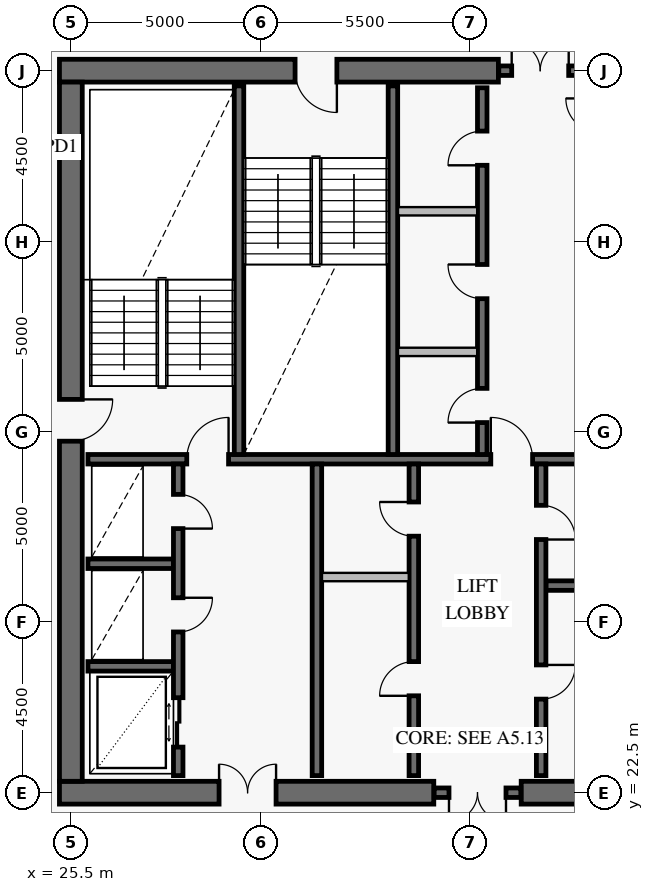
"""IFC4 building model, lengths in metres.
Left out: names, types, materials, properties, quantities, classifications, styles, units other than length and angle.
Written with IfcOpenShell. Run it as: python <this file> out.ifc"""

import sys

from ifc_helpers import new_model, si_unit, direction, frame, frame_2d, origin, place, context, subcontext, project, spatial, rectangle, extrude, element, fill, save


model = new_model("IFC4")
c1 = context("Model", 3, precision=1e-05, world=origin(), true_north=direction((0.0, 1.0)))
c2 = subcontext(c1, "Body", "Model", "MODEL_VIEW")
j1 = project(units=[si_unit("LENGTHUNIT", "METRE"), si_unit("PLANEANGLEUNIT", "RADIAN")], contexts=[c1])
p1 = place(None, origin())
s1 = spatial("IfcSite", under=j1, at=p1, CompositionType="ELEMENT")
p2 = place(p1, origin())
s2 = spatial("IfcBuilding", under=s1, at=p2, CompositionType="ELEMENT")
p3 = place(p2, frame((0.0, 0.0, 254.0)))
s3 = spatial("IfcBuildingStorey", under=s2, at=p3, CompositionType="ELEMENT", Elevation=254.0)
p4 = place(p3, frame((25.2, 22.5, 0.0), z_axis=(0.0, 0.0, 1.0), x_axis=(1.0, 0.0, 0.0)))
e1 = element("IfcWall", 1, at=p4, inside=s3, PredefinedType="SHEAR", context=c2, shape_type="SweptSolid", body=[
    extrude(rectangle(XDim=9.85, YDim=0.6, at=frame_2d((4.925, 0.0))), origin(), (0.0, 0.0, 1.0), 3.8),
])
p5 = place(p4, frame((4.2, 0.0, 0.0)))
e2 = element("IfcOpeningElement", 2, at=p5, cuts=e1, PredefinedType="OPENING", context=c2, shape_type="SweptSolid", body=[
    extrude(rectangle(XDim=1.5, YDim=2.15, at=frame_2d((0.75, 1.075))), frame((0.0, 0.312, 0.0), z_axis=(0.0, -1.0, 0.0), x_axis=(1.0, 0.0, 0.0)), (0.0, 0.0, 1.0), 0.624),
])
p6 = place(p3, frame((37.35, 22.5, 0.0), z_axis=(0.0, 0.0, 1.0), x_axis=(1.0, 0.0, 0.0)))
e3 = element("IfcWall", 3, at=p6, inside=s3, PredefinedType="SHEAR", context=c2, shape_type="SweptSolid", body=[
    extrude(rectangle(XDim=9.45, YDim=0.6, at=frame_2d((4.725, 0.0))), origin(), (0.0, 0.0, 1.0), 3.8),
])
p7 = place(p6, frame((3.95, 0.0, 0.0)))
e4 = element("IfcOpeningElement", 4, at=p7, cuts=e3, PredefinedType="OPENING", context=c2, shape_type="SweptSolid", body=[
    extrude(rectangle(XDim=1.5, YDim=2.15, at=frame_2d((0.75, 1.075))), frame((0.0, 0.312, 0.0), z_axis=(0.0, -1.0, 0.0), x_axis=(1.0, 0.0, 0.0)), (0.0, 0.0, 1.0), 0.624),
])
p8 = place(p3, frame((36.75, 41.5, 0.0), z_axis=(0.0, 0.0, 1.0), x_axis=(-1.0, 0.0, 0.0)))
e5 = element("IfcWall", 5, at=p8, inside=s3, PredefinedType="SHEAR", context=c2, shape_type="SweptSolid", body=[
    extrude(rectangle(XDim=11.55, YDim=0.6, at=frame_2d((5.775, 0.0))), origin(), (0.0, 0.0, 1.0), 3.8),
])
p9 = place(p8, frame((4.25, 0.0, 0.0)))
e6 = element("IfcOpeningElement", 6, at=p9, cuts=e5, PredefinedType="OPENING", context=c2, shape_type="SweptSolid", body=[
    extrude(rectangle(XDim=1.1, YDim=2.15, at=frame_2d((0.55, 1.075))), frame((0.0, 0.312, 0.0), z_axis=(0.0, -1.0, 0.0), x_axis=(1.0, 0.0, 0.0)), (0.0, 0.0, 1.0), 0.624),
])
p10 = place(p3, frame((25.5, 22.8, 0.0), z_axis=(0.0, 0.0, 1.0), x_axis=(0.0, 1.0, 0.0)))
e7 = element("IfcWall", 7, at=p10, inside=s3, PredefinedType="SHEAR", context=c2, shape_type="SweptSolid", body=[
    extrude(rectangle(XDim=18.4, YDim=0.6, at=frame_2d((9.2, 0.0))), origin(), (0.0, 0.0, 1.0), 3.8),
])
p11 = place(p10, frame((8.95, 0.0, 0.0)))
e8 = element("IfcOpeningElement", 8, at=p11, cuts=e7, PredefinedType="OPENING", context=c2, shape_type="SweptSolid", body=[
    extrude(rectangle(XDim=1.1, YDim=2.15, at=frame_2d((0.55, 1.075))), frame((0.0, 0.312, 0.0), z_axis=(0.0, -1.0, 0.0), x_axis=(1.0, 0.0, 0.0)), (0.0, 0.0, 1.0), 0.624),
])
p12 = place(p3, frame((35.06, 22.5, 0.0), z_axis=(0.0, 0.0, 1.0), x_axis=(1.0, 0.0, 0.0)))
e9 = element("IfcWall", 9, at=p12, inside=s3, PredefinedType="SOLIDWALL", context=c2, shape_type="SweptSolid", body=[
    extrude(rectangle(XDim=2.28, YDim=0.25, at=frame_2d((1.14, 0.0))), origin(), (0.0, 0.0, 1.0), 3.8),
])
p13 = place(p12, frame((0.39, 0.0, 0.0)))
e10 = element("IfcOpeningElement", 10, at=p13, cuts=e9, PredefinedType="OPENING", context=c2, shape_type="SweptSolid", body=[
    extrude(rectangle(XDim=1.5, YDim=2.15, at=frame_2d((0.75, 1.075))), frame((0.0, 0.137, 0.0), z_axis=(0.0, -1.0, 0.0), x_axis=(1.0, 0.0, 0.0)), (0.0, 0.0, 1.0), 0.274),
])
p14 = place(p3, frame((36.76, 41.5, 0.0), z_axis=(0.0, 0.0, 1.0), x_axis=(1.0, 0.0, 0.0)))
e11 = element("IfcWall", 11, at=p14, inside=s3, PredefinedType="SOLIDWALL", context=c2, shape_type="SweptSolid", body=[
    extrude(rectangle(XDim=2.18, YDim=0.25, at=frame_2d((1.09, 0.0))), origin(), (0.0, 0.0, 1.0), 3.8),
])
p15 = place(p14, frame((0.34, 0.0, 0.0)))
e12 = element("IfcOpeningElement", 12, at=p15, cuts=e11, PredefinedType="OPENING", context=c2, shape_type="SweptSolid", body=[
    extrude(rectangle(XDim=1.5, YDim=2.15, at=frame_2d((0.75, 1.075))), frame((0.0, 0.137, 0.0), z_axis=(0.0, -1.0, 0.0), x_axis=(1.0, 0.0, 0.0)), (0.0, 0.0, 1.0), 0.274),
])
p16 = place(p3, frame((25.95, 31.275, 0.0), z_axis=(0.0, 0.0, 1.0), x_axis=(1.0, 0.0, 0.0)))
e13 = element("IfcWall", 13, at=p16, inside=s3, PredefinedType="SOLIDWALL", context=c2, shape_type="SweptSolid", body=[
    extrude(rectangle(XDim=20.1, YDim=0.25, at=frame_2d((10.05, 0.0))), origin(), (0.0, 0.0, 1.0), 3.8),
])
p17 = place(p16, frame((2.6, 0.0, 0.0)))
e14 = element("IfcOpeningElement", 14, at=p17, cuts=e13, PredefinedType="OPENING", context=c2, shape_type="SweptSolid", body=[
    extrude(rectangle(XDim=1.1, YDim=2.15, at=frame_2d((0.55, 1.075))), frame((0.0, 0.137, 0.0), z_axis=(0.0, -1.0, 0.0), x_axis=(1.0, 0.0, 0.0)), (0.0, 0.0, 1.0), 0.274),
])
p18 = place(p16, frame((10.6, 0.0, 0.0)))
e15 = element("IfcOpeningElement", 15, at=p18, cuts=e13, PredefinedType="OPENING", context=c2, shape_type="SweptSolid", body=[
    extrude(rectangle(XDim=1.1, YDim=2.15, at=frame_2d((0.55, 1.075))), frame((0.0, 0.137, 0.0), z_axis=(0.0, -1.0, 0.0), x_axis=(1.0, 0.0, 0.0)), (0.0, 0.0, 1.0), 0.274),
])
p19 = place(p16, frame((16.35, 0.0, 0.0)))
e16 = element("IfcOpeningElement", 16, at=p19, cuts=e13, PredefinedType="OPENING", context=c2, shape_type="SweptSolid", body=[
    extrude(rectangle(XDim=1.1, YDim=2.15, at=frame_2d((0.55, 1.075))), frame((0.0, 0.137, 0.0), z_axis=(0.0, -1.0, 0.0), x_axis=(1.0, 0.0, 0.0)), (0.0, 0.0, 1.0), 0.274),
])
for number, where, z_axis, x_axis in (
    (17, (29.925, 31.4, 0.0), (0.0, 0.0, 1.0), (0.0, 1.0, 0.0)),
    (18, (33.975, 31.4, 0.0), (0.0, 0.0, 1.0), (0.0, 1.0, 0.0)),
):
    element("IfcWall", number, at=place(p3, frame(where, z_axis=z_axis, x_axis=x_axis)), inside=s3, PredefinedType="SOLIDWALL", context=c2, shape_type="SweptSolid", body=[
        extrude(rectangle(XDim=9.7, YDim=0.25, at=frame_2d((4.85, 0.0))), origin(), (0.0, 0.0, 1.0), 3.8),
    ])
p20 = place(p3, frame((36.325, 31.4, 0.0), z_axis=(0.0, 0.0, 1.0), x_axis=(0.0, 1.0, 0.0)))
e19 = element("IfcWall", 19, at=p20, inside=s3, PredefinedType="SOLIDWALL", context=c2, shape_type="SweptSolid", body=[
    extrude(rectangle(XDim=9.65, YDim=0.25, at=frame_2d((4.825, 0.0))), origin(), (0.0, 0.0, 1.0), 3.8),
])
p21 = place(p20, frame((0.84, 0.0, 0.0)))
e20 = element("IfcOpeningElement", 20, at=p21, cuts=e19, PredefinedType="OPENING", context=c2, shape_type="SweptSolid", body=[
    extrude(rectangle(XDim=0.9, YDim=2.1, at=frame_2d((0.45, 1.05))), frame((0.0, 0.137, 0.0), z_axis=(0.0, -1.0, 0.0), x_axis=(1.0, 0.0, 0.0)), (0.0, 0.0, 1.0), 0.274),
])
p22 = place(p20, frame((4.1, 0.0, 0.0)))
e21 = element("IfcOpeningElement", 21, at=p22, cuts=e19, PredefinedType="OPENING", context=c2, shape_type="SweptSolid", body=[
    extrude(rectangle(XDim=0.9, YDim=2.1, at=frame_2d((0.45, 1.05))), frame((0.0, 0.137, 0.0), z_axis=(0.0, -1.0, 0.0), x_axis=(1.0, 0.0, 0.0)), (0.0, 0.0, 1.0), 0.274),
])
p23 = place(p20, frame((7.61, 0.0, 0.0)))
e22 = element("IfcOpeningElement", 22, at=p23, cuts=e19, PredefinedType="OPENING", context=c2, shape_type="SweptSolid", body=[
    extrude(rectangle(XDim=0.9, YDim=2.1, at=frame_2d((0.45, 1.05))), frame((0.0, 0.137, 0.0), z_axis=(0.0, -1.0, 0.0), x_axis=(1.0, 0.0, 0.0)), (0.0, 0.0, 1.0), 0.274),
])
for number, where, z_axis, x_axis in (
    (23, (25.95, 25.825, 0.0), (0.0, 0.0, 1.0), (1.0, 0.0, 0.0)),
    (24, (25.95, 28.525, 0.0), (0.0, 0.0, 1.0), (1.0, 0.0, 0.0)),
):
    element("IfcWall", number, at=place(p3, frame(where, z_axis=z_axis, x_axis=x_axis)), inside=s3, PredefinedType="SOLIDWALL", context=c2, shape_type="SweptSolid", body=[
        extrude(rectangle(XDim=2.25, YDim=0.25, at=frame_2d((1.125, 0.0))), origin(), (0.0, 0.0, 1.0), 3.8),
    ])
p24 = place(p3, frame((28.325, 22.95, 0.0), z_axis=(0.0, 0.0, 1.0), x_axis=(0.0, 1.0, 0.0)))
e25 = element("IfcWall", 25, at=p24, inside=s3, PredefinedType="SOLIDWALL", context=c2, shape_type="SweptSolid", body=[
    extrude(rectangle(XDim=8.2, YDim=0.25, at=frame_2d((4.1, 0.0))), origin(), (0.0, 0.0, 1.0), 3.8),
])
p25 = place(p24, frame((0.75, 0.0, 0.0)))
e26 = element("IfcOpeningElement", 26, at=p25, cuts=e25, PredefinedType="OPENING", context=c2, shape_type="SweptSolid", body=[
    extrude(rectangle(XDim=1.3, YDim=2.3, at=frame_2d((0.65, 1.15))), frame((0.0, 0.137, 0.0), z_axis=(0.0, -1.0, 0.0), x_axis=(1.0, 0.0, 0.0)), (0.0, 0.0, 1.0), 0.274),
])
p26 = place(p24, frame((3.78, 0.0, 0.0)))
e27 = element("IfcOpeningElement", 27, at=p26, cuts=e25, PredefinedType="OPENING", context=c2, shape_type="SweptSolid", body=[
    extrude(rectangle(XDim=0.9, YDim=2.1, at=frame_2d((0.45, 1.05))), frame((0.0, 0.137, 0.0), z_axis=(0.0, -1.0, 0.0), x_axis=(1.0, 0.0, 0.0)), (0.0, 0.0, 1.0), 0.274),
])
p27 = place(p24, frame((6.5, 0.0, 0.0)))
e28 = element("IfcOpeningElement", 28, at=p27, cuts=e25, PredefinedType="OPENING", context=c2, shape_type="SweptSolid", body=[
    extrude(rectangle(XDim=0.9, YDim=2.1, at=frame_2d((0.45, 1.05))), frame((0.0, 0.137, 0.0), z_axis=(0.0, -1.0, 0.0), x_axis=(1.0, 0.0, 0.0)), (0.0, 0.0, 1.0), 0.274),
])
p28 = place(p3, frame((31.975, 22.95, 0.0), z_axis=(0.0, 0.0, 1.0), x_axis=(0.0, 1.0, 0.0)))
e29 = element("IfcWall", 29, at=p28, inside=s3, PredefinedType="SOLIDWALL", context=c2, shape_type="SweptSolid", body=[
    extrude(rectangle(XDim=8.2, YDim=0.25, at=frame_2d((4.1, 0.0))), origin(), (0.0, 0.0, 1.0), 3.8),
])
p29 = place(p3, frame((34.525, 22.95, 0.0), z_axis=(0.0, 0.0, 1.0), x_axis=(0.0, 1.0, 0.0)))
e30 = element("IfcWall", 30, at=p29, inside=s3, PredefinedType="SOLIDWALL", context=c2, shape_type="SweptSolid", body=[
    extrude(rectangle(XDim=8.2, YDim=0.25, at=frame_2d((4.1, 0.0))), origin(), (0.0, 0.0, 1.0), 3.8),
])
p30 = place(p29, frame((2.1, 0.0, 0.0)))
e31 = element("IfcOpeningElement", 31, at=p30, cuts=e30, PredefinedType="OPENING", context=c2, shape_type="SweptSolid", body=[
    extrude(rectangle(XDim=0.9, YDim=2.1, at=frame_2d((0.45, 1.05))), frame((0.0, 0.137, 0.0), z_axis=(0.0, -1.0, 0.0), x_axis=(1.0, 0.0, 0.0)), (0.0, 0.0, 1.0), 0.274),
])
p31 = place(p29, frame((6.3, 0.0, 0.0)))
e32 = element("IfcOpeningElement", 32, at=p31, cuts=e30, PredefinedType="OPENING", context=c2, shape_type="SweptSolid", body=[
    extrude(rectangle(XDim=0.9, YDim=2.1, at=frame_2d((0.45, 1.05))), frame((0.0, 0.137, 0.0), z_axis=(0.0, -1.0, 0.0), x_axis=(1.0, 0.0, 0.0)), (0.0, 0.0, 1.0), 0.274),
])
p32 = place(p3, frame((38.0, 27.95, 0.0), z_axis=(0.0, 0.0, 1.0), x_axis=(1.0, 0.0, 0.0)))
e33 = element("IfcWall", 33, at=p32, inside=s3, PredefinedType="SOLIDWALL", context=c2, shape_type="SweptSolid", body=[
    extrude(rectangle(XDim=2.3, YDim=0.25, at=frame_2d((1.15, 0.0))), origin(), (0.0, 0.0, 1.0), 3.8),
])
p33 = place(p3, frame((37.875, 22.95, 0.0), z_axis=(0.0, 0.0, 1.0), x_axis=(0.0, 1.0, 0.0)))
e34 = element("IfcWall", 34, at=p33, inside=s3, PredefinedType="SOLIDWALL", context=c2, shape_type="SweptSolid", body=[
    extrude(rectangle(XDim=8.2, YDim=0.25, at=frame_2d((4.1, 0.0))), origin(), (0.0, 0.0, 1.0), 3.8),
])
p34 = place(p33, frame((2.012, 0.0, 0.0)))
e35 = element("IfcOpeningElement", 35, at=p34, cuts=e34, PredefinedType="OPENING", context=c2, shape_type="SweptSolid", body=[
    extrude(rectangle(XDim=0.9, YDim=2.1, at=frame_2d((0.45, 1.05))), frame((0.0, 0.137, 0.0), z_axis=(0.0, -1.0, 0.0), x_axis=(1.0, 0.0, 0.0)), (0.0, 0.0, 1.0), 0.274),
])
p35 = place(p33, frame((6.212, 0.0, 0.0)))
e36 = element("IfcOpeningElement", 36, at=p35, cuts=e34, PredefinedType="OPENING", context=c2, shape_type="SweptSolid", body=[
    extrude(rectangle(XDim=0.9, YDim=2.1, at=frame_2d((0.45, 1.05))), frame((0.0, 0.137, 0.0), z_axis=(0.0, -1.0, 0.0), x_axis=(1.0, 0.0, 0.0)), (0.0, 0.0, 1.0), 0.274),
])
for number, where, z_axis, x_axis in (
    (37, (34.108, 34.1, 0.0), (0.0, 0.0, 1.0), (1.0, 0.0, 0.0)),
    (38, (34.108, 37.8, 0.0), (0.0, 0.0, 1.0), (1.0, 0.0, 0.0)),
):
    element("IfcWall", number, at=place(p3, frame(where, z_axis=z_axis, x_axis=x_axis)), inside=s3, PredefinedType="PARTITIONING", context=c2, shape_type="SweptSolid", body=[
        extrude(rectangle(XDim=2.084, YDim=0.22, at=frame_2d((1.042, 0.0))), origin(), (0.0, 0.0, 1.0), 3.55),
    ])
p36 = place(p3, frame((32.108, 28.175, 0.0), z_axis=(0.0, 0.0, 1.0), x_axis=(1.0, 0.0, 0.0)))
e39 = element("IfcWall", 39, at=p36, inside=s3, PredefinedType="PARTITIONING", context=c2, shape_type="SweptSolid", body=[
    extrude(rectangle(XDim=2.284, YDim=0.22, at=frame_2d((1.142, 0.0))), origin(), (0.0, 0.0, 1.0), 3.55),
])
p37 = place(p11, frame((1.1, 0.0, 0.0), z_axis=(0.0, 0.0, 1.0), x_axis=(-1.0, 0.0, 0.0)))
e40 = element("IfcDoor", 40, at=p37, inside=s3, OperationType="SINGLE_SWING_LEFT", PredefinedType="USERDEFINED", context=c2, shape_type="SweptSolid", body=[
    extrude(rectangle(XDim=1.1, YDim=2.15, at=frame_2d((0.55, 1.075))), frame((0.0, 0.025, 0.0), z_axis=(0.0, -1.0, 0.0), x_axis=(1.0, 0.0, 0.0)), (0.0, 0.0, 1.0), 0.05),
])
fill(e8, e40)
p38 = place(p9, origin())
e41 = element("IfcDoor", 41, at=p38, inside=s3, OperationType="SINGLE_SWING_LEFT", PredefinedType="USERDEFINED", context=c2, shape_type="SweptSolid", body=[
    extrude(rectangle(XDim=1.1, YDim=2.15, at=frame_2d((0.55, 1.075))), frame((0.0, 0.025, 0.0), z_axis=(0.0, -1.0, 0.0), x_axis=(1.0, 0.0, 0.0)), (0.0, 0.0, 1.0), 0.05),
])
fill(e6, e41)
p39 = place(p5, origin())
e42 = element("IfcDoor", 42, at=p39, inside=s3, OperationType="DOUBLE_DOOR_SINGLE_SWING", PredefinedType="DOOR", context=c2, shape_type="SweptSolid", body=[
    extrude(rectangle(XDim=1.5, YDim=2.15, at=frame_2d((0.75, 1.075))), frame((0.0, 0.025, 0.0), z_axis=(0.0, -1.0, 0.0), x_axis=(1.0, 0.0, 0.0)), (0.0, 0.0, 1.0), 0.05),
])
fill(e2, e42)
p40 = place(p13, frame((1.5, 0.0, 0.0), z_axis=(0.0, 0.0, 1.0), x_axis=(-1.0, 0.0, 0.0)))
e43 = element("IfcDoor", 43, at=p40, inside=s3, OperationType="DOUBLE_DOOR_SINGLE_SWING", PredefinedType="DOOR", context=c2, shape_type="SweptSolid", body=[
    extrude(rectangle(XDim=1.5, YDim=2.15, at=frame_2d((0.75, 1.075))), frame((0.0, 0.025, 0.0), z_axis=(0.0, -1.0, 0.0), x_axis=(1.0, 0.0, 0.0)), (0.0, 0.0, 1.0), 0.05),
])
fill(e10, e43)
p41 = place(p15, origin())
e44 = element("IfcDoor", 44, at=p41, inside=s3, OperationType="DOUBLE_DOOR_SINGLE_SWING", PredefinedType="DOOR", context=c2, shape_type="SweptSolid", body=[
    extrude(rectangle(XDim=1.5, YDim=2.15, at=frame_2d((0.75, 1.075))), frame((0.0, 0.025, 0.0), z_axis=(0.0, -1.0, 0.0), x_axis=(1.0, 0.0, 0.0)), (0.0, 0.0, 1.0), 0.05),
])
fill(e12, e44)
p42 = place(p17, origin())
e45 = element("IfcDoor", 45, at=p42, inside=s3, OperationType="SINGLE_SWING_RIGHT", PredefinedType="USERDEFINED", context=c2, shape_type="SweptSolid", body=[
    extrude(rectangle(XDim=1.1, YDim=2.15, at=frame_2d((0.55, 1.075))), frame((0.0, 0.025, 0.0), z_axis=(0.0, -1.0, 0.0), x_axis=(1.0, 0.0, 0.0)), (0.0, 0.0, 1.0), 0.05),
])
fill(e14, e45)
p43 = place(p18, origin())
e46 = element("IfcDoor", 46, at=p43, inside=s3, OperationType="SINGLE_SWING_LEFT", PredefinedType="USERDEFINED", context=c2, shape_type="SweptSolid", body=[
    extrude(rectangle(XDim=1.1, YDim=2.15, at=frame_2d((0.55, 1.075))), frame((0.0, 0.025, 0.0), z_axis=(0.0, -1.0, 0.0), x_axis=(1.0, 0.0, 0.0)), (0.0, 0.0, 1.0), 0.05),
])
fill(e15, e46)
p44 = place(p21, origin())
e47 = element("IfcDoor", 47, at=p44, inside=s3, OperationType="SINGLE_SWING_LEFT", PredefinedType="DOOR", context=c2, shape_type="SweptSolid", body=[
    extrude(rectangle(XDim=0.9, YDim=2.1, at=frame_2d((0.45, 1.05))), frame((0.0, 0.025, 0.0), z_axis=(0.0, -1.0, 0.0), x_axis=(1.0, 0.0, 0.0)), (0.0, 0.0, 1.0), 0.05),
])
fill(e20, e47)
p45 = place(p22, origin())
e48 = element("IfcDoor", 48, at=p45, inside=s3, OperationType="SINGLE_SWING_RIGHT", PredefinedType="DOOR", context=c2, shape_type="SweptSolid", body=[
    extrude(rectangle(XDim=0.9, YDim=2.1, at=frame_2d((0.45, 1.05))), frame((0.0, 0.025, 0.0), z_axis=(0.0, -1.0, 0.0), x_axis=(1.0, 0.0, 0.0)), (0.0, 0.0, 1.0), 0.05),
])
fill(e21, e48)
p46 = place(p23, origin())
e49 = element("IfcDoor", 49, at=p46, inside=s3, OperationType="SINGLE_SWING_LEFT", PredefinedType="DOOR", context=c2, shape_type="SweptSolid", body=[
    extrude(rectangle(XDim=0.9, YDim=2.1, at=frame_2d((0.45, 1.05))), frame((0.0, 0.025, 0.0), z_axis=(0.0, -1.0, 0.0), x_axis=(1.0, 0.0, 0.0)), (0.0, 0.0, 1.0), 0.05),
])
fill(e22, e49)
p47 = place(p25, frame((1.3, 0.0, 0.0), z_axis=(0.0, 0.0, 1.0), x_axis=(-1.0, 0.0, 0.0)))
e50 = element("IfcDoor", 50, at=p47, inside=s3, OperationType="DOUBLE_DOOR_SLIDING", PredefinedType="DOOR", context=c2, shape_type="SweptSolid", body=[
    extrude(rectangle(XDim=1.3, YDim=2.3, at=frame_2d((0.65, 1.15))), frame((0.0, 0.025, 0.0), z_axis=(0.0, -1.0, 0.0), x_axis=(1.0, 0.0, 0.0)), (0.0, 0.0, 1.0), 0.05),
])
fill(e26, e50)
p48 = place(p26, frame((0.9, 0.0, 0.0), z_axis=(0.0, 0.0, 1.0), x_axis=(-1.0, 0.0, 0.0)))
e51 = element("IfcDoor", 51, at=p48, inside=s3, OperationType="SINGLE_SWING_LEFT", PredefinedType="DOOR", context=c2, shape_type="SweptSolid", body=[
    extrude(rectangle(XDim=0.9, YDim=2.1, at=frame_2d((0.45, 1.05))), frame((0.0, 0.025, 0.0), z_axis=(0.0, -1.0, 0.0), x_axis=(1.0, 0.0, 0.0)), (0.0, 0.0, 1.0), 0.05),
])
fill(e27, e51)
p49 = place(p27, frame((0.9, 0.0, 0.0), z_axis=(0.0, 0.0, 1.0), x_axis=(-1.0, 0.0, 0.0)))
e52 = element("IfcDoor", 52, at=p49, inside=s3, OperationType="SINGLE_SWING_RIGHT", PredefinedType="DOOR", context=c2, shape_type="SweptSolid", body=[
    extrude(rectangle(XDim=0.9, YDim=2.1, at=frame_2d((0.45, 1.05))), frame((0.0, 0.025, 0.0), z_axis=(0.0, -1.0, 0.0), x_axis=(1.0, 0.0, 0.0)), (0.0, 0.0, 1.0), 0.05),
])
fill(e28, e52)
p50 = place(p30, origin())
e53 = element("IfcDoor", 53, at=p50, inside=s3, OperationType="SINGLE_SWING_LEFT", PredefinedType="DOOR", context=c2, shape_type="SweptSolid", body=[
    extrude(rectangle(XDim=0.9, YDim=2.1, at=frame_2d((0.45, 1.05))), frame((0.0, 0.025, 0.0), z_axis=(0.0, -1.0, 0.0), x_axis=(1.0, 0.0, 0.0)), (0.0, 0.0, 1.0), 0.05),
])
fill(e31, e53)
p51 = place(p31, origin())
e54 = element("IfcDoor", 54, at=p51, inside=s3, OperationType="SINGLE_SWING_RIGHT", PredefinedType="DOOR", context=c2, shape_type="SweptSolid", body=[
    extrude(rectangle(XDim=0.9, YDim=2.1, at=frame_2d((0.45, 1.05))), frame((0.0, 0.025, 0.0), z_axis=(0.0, -1.0, 0.0), x_axis=(1.0, 0.0, 0.0)), (0.0, 0.0, 1.0), 0.05),
])
fill(e32, e54)
p52 = place(p34, frame((0.9, 0.0, 0.0), z_axis=(0.0, 0.0, 1.0), x_axis=(-1.0, 0.0, 0.0)))
e55 = element("IfcDoor", 55, at=p52, inside=s3, OperationType="SINGLE_SWING_LEFT", PredefinedType="DOOR", context=c2, shape_type="SweptSolid", body=[
    extrude(rectangle(XDim=0.9, YDim=2.1, at=frame_2d((0.45, 1.05))), frame((0.0, 0.025, 0.0), z_axis=(0.0, -1.0, 0.0), x_axis=(1.0, 0.0, 0.0)), (0.0, 0.0, 1.0), 0.05),
])
fill(e35, e55)
p53 = place(p35, frame((0.9, 0.0, 0.0), z_axis=(0.0, 0.0, 1.0), x_axis=(-1.0, 0.0, 0.0)))
e56 = element("IfcDoor", 56, at=p53, inside=s3, OperationType="SINGLE_SWING_RIGHT", PredefinedType="DOOR", context=c2, shape_type="SweptSolid", body=[
    extrude(rectangle(XDim=0.9, YDim=2.1, at=frame_2d((0.45, 1.05))), frame((0.0, 0.025, 0.0), z_axis=(0.0, -1.0, 0.0), x_axis=(1.0, 0.0, 0.0)), (0.0, 0.0, 1.0), 0.05),
])
fill(e36, e56)
save(model, sys.argv[1])
